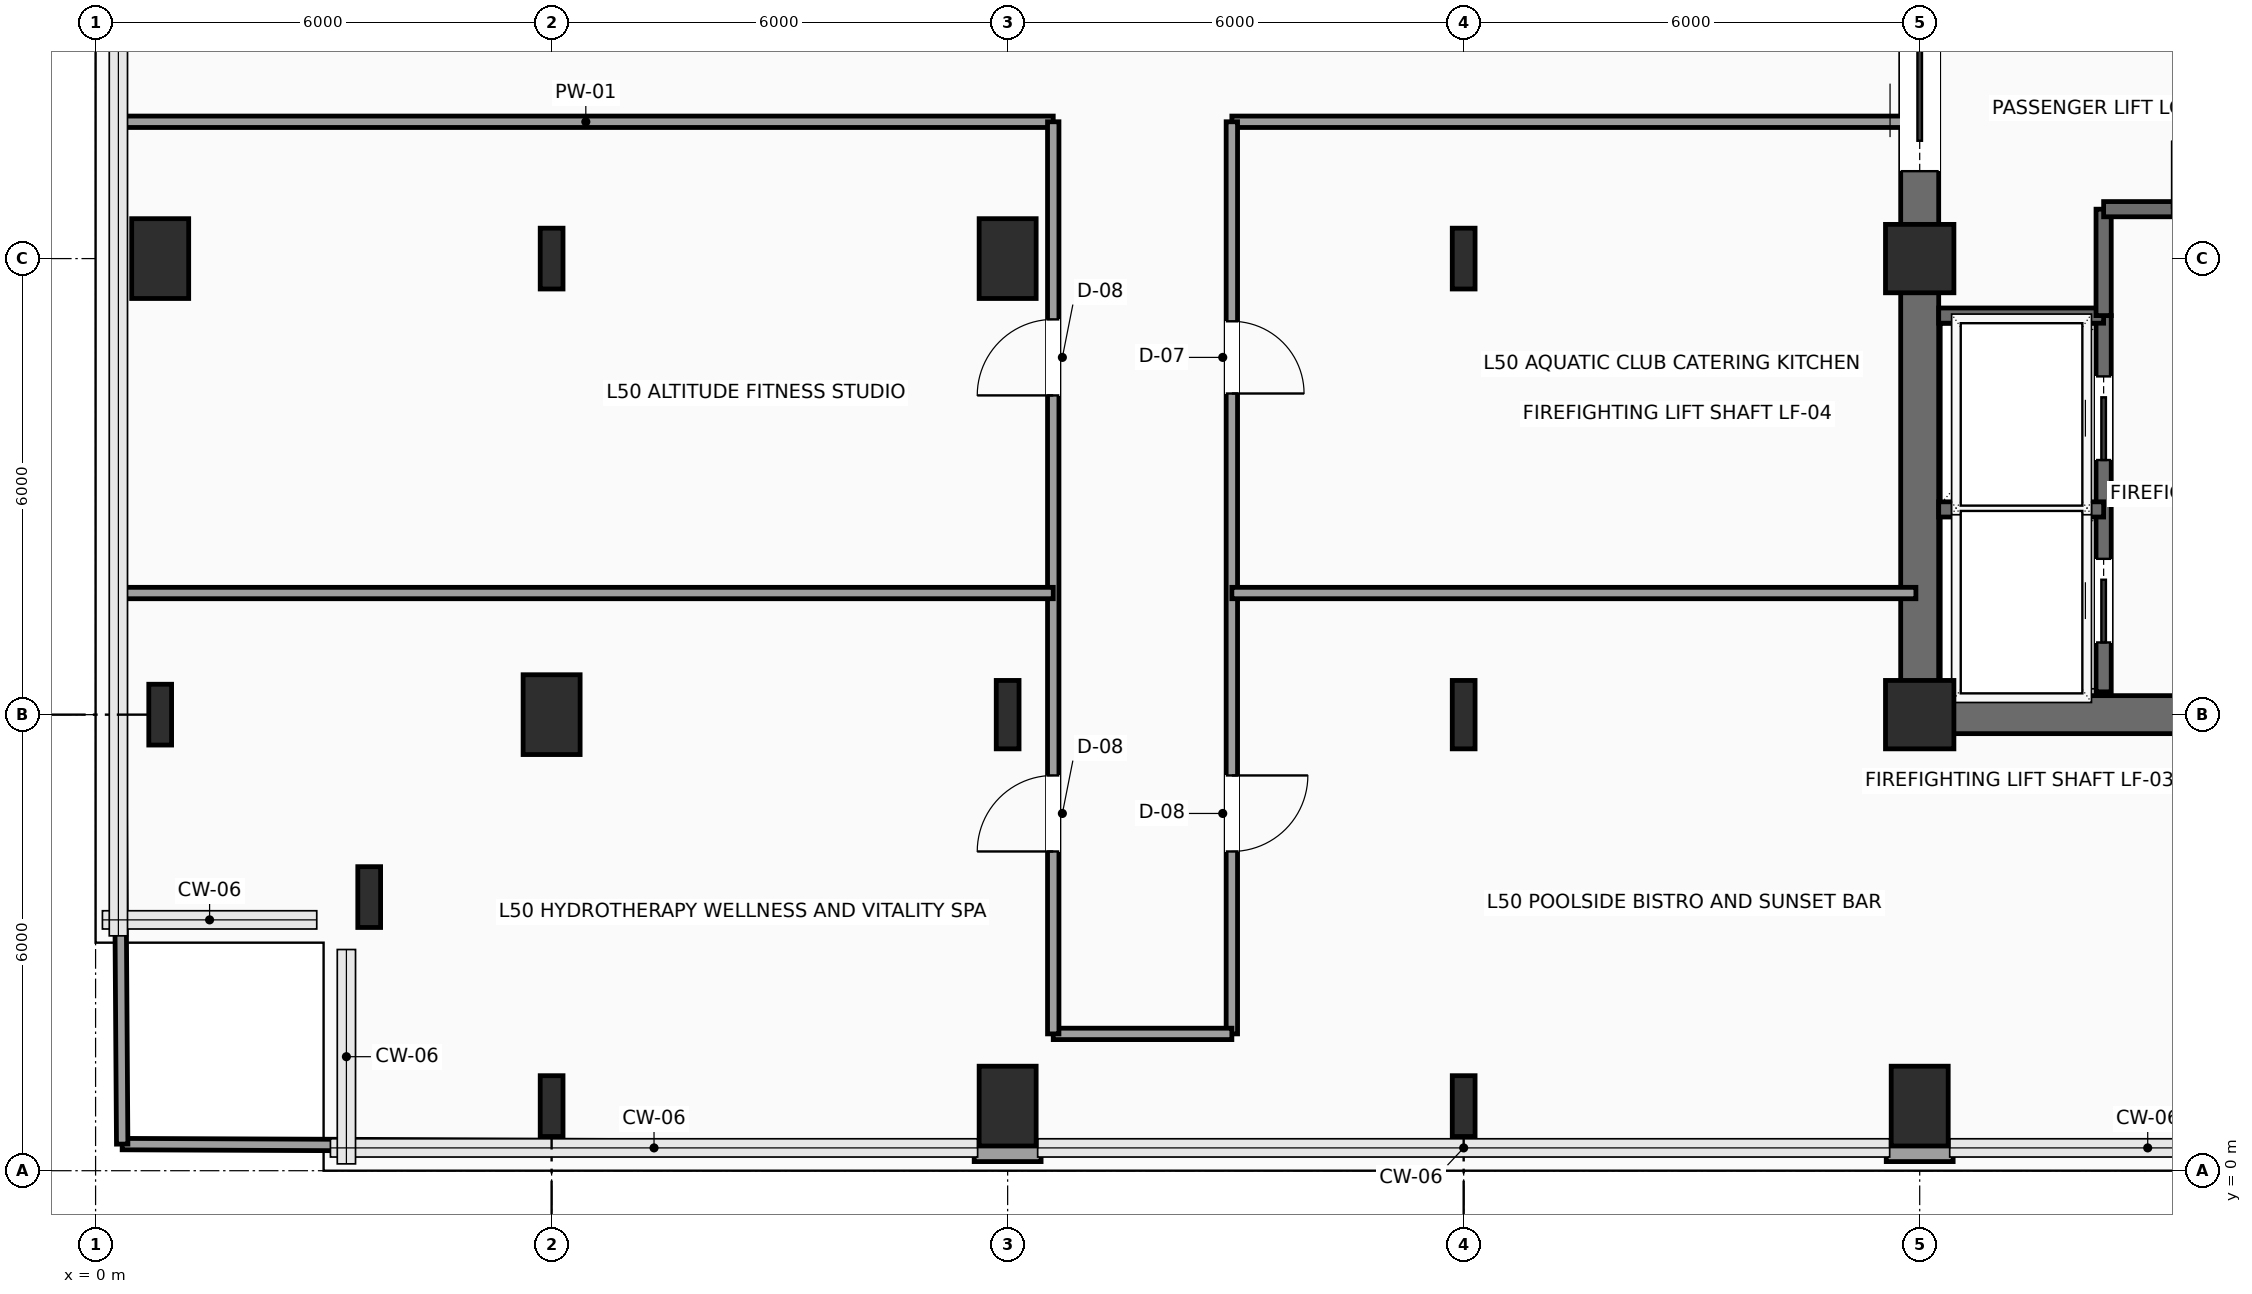
"""IFC4 building model, lengths in metres.
Left out: names, types, materials, properties, quantities, classifications, styles, units other than length and angle.
Written with IfcOpenShell. Run it as: python <this file> out.ifc"""

import sys

from ifc_helpers import new_model, si_unit, direction, frame, frame_2d, origin, origin_2d, place, context, subcontext, project, spatial, rectangle, i_section, extrude, element, fill, save


model = new_model("IFC4")
c1 = context("Model", 3, precision=1e-05, world=origin(), true_north=direction((0.0, 1.0)))
c2 = subcontext(c1, "Body", "Model", "MODEL_VIEW")
j1 = project(units=[si_unit("LENGTHUNIT", "METRE"), si_unit("PLANEANGLEUNIT", "RADIAN")], contexts=[c1])
p1 = place(None, origin())
s1 = spatial("IfcSite", under=j1, at=p1, CompositionType="ELEMENT")
p2 = place(p1, origin())
s2 = spatial("IfcBuilding", under=s1, at=p2, CompositionType="ELEMENT")
p3 = place(p2, frame((0.0, 0.0, 204.0)))
s3 = spatial("IfcBuildingStorey", under=s2, at=p3, CompositionType="ELEMENT", Elevation=204.0)
for number, where, z_axis, x_axis in (
    (1, (24.0, 6.0, 0.0), (0.0, 0.0, 1.0), (1.0, 0.0, 0.0)),
    (2, (24.0, 12.0, 0.0), (0.0, 0.0, 1.0), (1.0, 0.0, 0.0)),
):
    element("IfcColumn", number, at=place(p3, frame(where, z_axis=z_axis, x_axis=x_axis)), inside=s3, PredefinedType="COLUMN", context=c2, shape_type="SweptSolid", body=[
        extrude(rectangle(XDim=0.9, YDim=0.9, at=origin_2d()), origin(), (0.0, 0.0, 1.0), 4.65),
    ])
for number, where, z_axis, x_axis in (
    (3, (3.6, 3.6, 0.0), (0.0, 0.0, 1.0), (1.0, 0.0, 0.0)),
    (4, (0.85, 6.0, 0.0), (0.0, 0.0, 1.0), (1.0, 0.0, 0.0)),
):
    element("IfcColumn", number, at=place(p3, frame(where, z_axis=z_axis, x_axis=x_axis)), inside=s3, PredefinedType="COLUMN", context=c2, shape_type="SweptSolid", body=[
        extrude(i_section(OverallWidth=0.3, OverallDepth=0.8, WebThickness=0.018, FlangeThickness=0.033, FilletRadius=0.03, at=origin_2d()), origin(), (0.0, 0.0, 1.0), 4.65),
    ])
p4 = place(p3, frame((0.85, 12.0, 0.0), z_axis=(0.0, 0.0, 1.0), x_axis=(1.0, 0.0, 0.0)))
e5 = element("IfcColumn", 5, at=p4, inside=s3, PredefinedType="COLUMN", context=c2, shape_type="SweptSolid", body=[
    extrude(rectangle(XDim=0.75, YDim=1.05, at=origin_2d()), origin(), (0.0, 0.0, 1.0), 4.65),
])
p5 = place(p3, frame((6.0, 0.85, 0.0), z_axis=(0.0, 0.0, 1.0), x_axis=(1.0, 0.0, 0.0)))
e6 = element("IfcColumn", 6, at=p5, inside=s3, PredefinedType="COLUMN", context=c2, shape_type="SweptSolid", body=[
    extrude(i_section(OverallWidth=0.3, OverallDepth=0.8, WebThickness=0.018, FlangeThickness=0.033, FilletRadius=0.03, at=origin_2d()), origin(), (0.0, 0.0, 1.0), 4.65),
])
p6 = place(p3, frame((6.0, 6.0, 0.0), z_axis=(0.0, 0.0, 1.0), x_axis=(1.0, 0.0, 0.0)))
e7 = element("IfcColumn", 7, at=p6, inside=s3, PredefinedType="COLUMN", context=c2, shape_type="SweptSolid", body=[
    extrude(rectangle(XDim=0.75, YDim=1.05, at=origin_2d()), origin(), (0.0, 0.0, 1.0), 4.65),
])
p7 = place(p3, frame((6.0, 12.0, 0.0), z_axis=(0.0, 0.0, 1.0), x_axis=(1.0, 0.0, 0.0)))
e8 = element("IfcColumn", 8, at=p7, inside=s3, PredefinedType="COLUMN", context=c2, shape_type="SweptSolid", body=[
    extrude(i_section(OverallWidth=0.3, OverallDepth=0.8, WebThickness=0.018, FlangeThickness=0.033, FilletRadius=0.03, at=origin_2d()), origin(), (0.0, 0.0, 1.0), 4.65),
])
p8 = place(p3, frame((12.0, 0.85, 0.0), z_axis=(0.0, 0.0, 1.0), x_axis=(1.0, 0.0, 0.0)))
e9 = element("IfcColumn", 9, at=p8, inside=s3, PredefinedType="COLUMN", context=c2, shape_type="SweptSolid", body=[
    extrude(rectangle(XDim=0.75, YDim=1.05, at=origin_2d()), origin(), (0.0, 0.0, 1.0), 4.65),
])
p9 = place(p3, frame((12.0, 6.0, 0.0), z_axis=(0.0, 0.0, 1.0), x_axis=(1.0, 0.0, 0.0)))
e10 = element("IfcColumn", 10, at=p9, inside=s3, PredefinedType="COLUMN", context=c2, shape_type="SweptSolid", body=[
    extrude(i_section(OverallWidth=0.3, OverallDepth=0.9, WebThickness=0.019, FlangeThickness=0.035, FilletRadius=0.03, at=origin_2d()), origin(), (0.0, 0.0, 1.0), 4.65),
])
p10 = place(p3, frame((12.0, 12.0, 0.0), z_axis=(0.0, 0.0, 1.0), x_axis=(1.0, 0.0, 0.0)))
e11 = element("IfcColumn", 11, at=p10, inside=s3, PredefinedType="COLUMN", context=c2, shape_type="SweptSolid", body=[
    extrude(rectangle(XDim=0.75, YDim=1.05, at=origin_2d()), origin(), (0.0, 0.0, 1.0), 4.65),
])
p11 = place(p3, frame((18.0, 0.85, 0.0), z_axis=(0.0, 0.0, 1.0), x_axis=(1.0, 0.0, 0.0)))
e12 = element("IfcColumn", 12, at=p11, inside=s3, PredefinedType="COLUMN", context=c2, shape_type="SweptSolid", body=[
    extrude(i_section(OverallWidth=0.3, OverallDepth=0.8, WebThickness=0.018, FlangeThickness=0.033, FilletRadius=0.03, at=origin_2d()), origin(), (0.0, 0.0, 1.0), 4.65),
])
p12 = place(p3, frame((18.0, 6.0, 0.0), z_axis=(0.0, 0.0, 1.0), x_axis=(1.0, 0.0, 0.0)))
e13 = element("IfcColumn", 13, at=p12, inside=s3, PredefinedType="COLUMN", context=c2, shape_type="SweptSolid", body=[
    extrude(i_section(OverallWidth=0.3, OverallDepth=0.9, WebThickness=0.019, FlangeThickness=0.035, FilletRadius=0.03, at=origin_2d()), origin(), (0.0, 0.0, 1.0), 4.65),
])
p13 = place(p3, frame((18.0, 12.0, 0.0), z_axis=(0.0, 0.0, 1.0), x_axis=(1.0, 0.0, 0.0)))
e14 = element("IfcColumn", 14, at=p13, inside=s3, PredefinedType="COLUMN", context=c2, shape_type="SweptSolid", body=[
    extrude(i_section(OverallWidth=0.3, OverallDepth=0.8, WebThickness=0.018, FlangeThickness=0.033, FilletRadius=0.03, at=origin_2d()), origin(), (0.0, 0.0, 1.0), 4.65),
])
p14 = place(p3, frame((24.0, 0.85, 0.0), z_axis=(0.0, 0.0, 1.0), x_axis=(1.0, 0.0, 0.0)))
e15 = element("IfcColumn", 15, at=p14, inside=s3, PredefinedType="COLUMN", context=c2, shape_type="SweptSolid", body=[
    extrude(rectangle(XDim=0.75, YDim=1.05, at=origin_2d()), origin(), (0.0, 0.0, 1.0), 4.65),
])
for number, where, z_axis, x_axis in (
    (16, (24.44, 0.24, 0.0), (0.0, 0.0, 1.0), (-1.0, 0.0, 0.0)),
    (17, (12.44, 0.24, 0.0), (0.0, 0.0, 1.0), (-1.0, 0.0, 0.0)),
):
    element("IfcWall", number, at=place(p3, frame(where, z_axis=z_axis, x_axis=x_axis)), inside=s3, PredefinedType="SOLIDWALL", context=c2, shape_type="SweptSolid", body=[
        extrude(rectangle(XDim=0.88, YDim=0.24, at=frame_2d((0.44, 0.0))), origin(), (0.0, 0.0, 1.0), 4.44),
    ])
p15 = place(p3, frame((24.0, 6.0, 0.0), z_axis=(0.0, 0.0, 1.0), x_axis=(1.0, 0.0, 0.0)))
e18 = element("IfcWall", 18, at=p15, inside=s3, PredefinedType="SHEAR", context=c2, shape_type="SweptSolid", body=[
    extrude(rectangle(XDim=9.6, YDim=0.5, at=frame_2d((4.8, 0.0))), origin(), (0.0, 0.0, 1.0), 4.44),
])
p16 = place(p3, frame((24.0, 6.0, 0.0), z_axis=(0.0, 0.0, 1.0), x_axis=(0.0, 1.0, 0.0)))
e19 = element("IfcWall", 19, at=p16, inside=s3, PredefinedType="SHEAR", context=c2, shape_type="SweptSolid", body=[
    extrude(rectangle(XDim=12.0, YDim=0.5, at=frame_2d((6.0, 0.0))), origin(), (0.0, 0.0, 1.0), 4.44),
])
p17 = place(p16, frame((7.15, 0.0, 0.0)))
e20 = element("IfcOpeningElement", 20, at=p17, cuts=e19, PredefinedType="OPENING", context=c2, shape_type="SweptSolid", body=[
    extrude(rectangle(XDim=1.6, YDim=2.3, at=frame_2d((0.8, 1.15))), frame((0.0, 0.26, 0.0), z_axis=(0.0, -1.0, 0.0), x_axis=(1.0, 0.0, 0.0)), (0.0, 0.0, 1.0), 0.52),
])
p18 = place(p3, frame((26.42, 6.3, 0.0), z_axis=(0.0, 0.0, 1.0), x_axis=(0.0, 1.0, 0.0)))
e21 = element("IfcWall", 21, at=p18, inside=s3, PredefinedType="SHEAR", context=c2, shape_type="SweptSolid", body=[
    extrude(rectangle(XDim=4.95, YDim=0.2, at=frame_2d((2.475, 0.0))), origin(), (0.0, 0.0, 1.0), 4.44),
])
p19 = place(p18, frame((0.65, 0.0, 0.0)))
e22 = element("IfcOpeningElement", 22, at=p19, cuts=e21, PredefinedType="OPENING", context=c2, shape_type="SweptSolid", body=[
    extrude(rectangle(XDim=1.1, YDim=2.2, at=frame_2d((0.55, 1.1))), frame((0.0, 0.11, 0.0), z_axis=(0.0, -1.0, 0.0), x_axis=(1.0, 0.0, 0.0)), (0.0, 0.0, 1.0), 0.22),
])
p20 = place(p18, frame((3.05, 0.0, 0.0)))
e23 = element("IfcOpeningElement", 23, at=p20, cuts=e21, PredefinedType="OPENING", context=c2, shape_type="SweptSolid", body=[
    extrude(rectangle(XDim=1.1, YDim=2.2, at=frame_2d((0.55, 1.1))), frame((0.0, 0.11, 0.0), z_axis=(0.0, -1.0, 0.0), x_axis=(1.0, 0.0, 0.0)), (0.0, 0.0, 1.0), 0.22),
])
for number, where, z_axis, x_axis in (
    (24, (24.25, 8.7, 0.0), (0.0, 0.0, 1.0), (1.0, 0.0, 0.0)),
    (25, (24.25, 11.25, 0.0), (0.0, 0.0, 1.0), (1.0, 0.0, 0.0)),
):
    element("IfcWall", number, at=place(p3, frame(where, z_axis=z_axis, x_axis=x_axis)), inside=s3, PredefinedType="SHEAR", context=c2, shape_type="SweptSolid", body=[
        extrude(rectangle(XDim=2.17, YDim=0.2, at=frame_2d((1.085, 0.0))), origin(), (0.0, 0.0, 1.0), 4.44),
    ])
p21 = place(p3, frame((26.42, 11.25, 0.0), z_axis=(0.0, 0.0, 1.0), x_axis=(0.0, 1.0, 0.0)))
e26 = element("IfcWall", 26, at=p21, inside=s3, PredefinedType="SHEAR", context=c2, shape_type="SweptSolid", body=[
    extrude(rectangle(XDim=1.4, YDim=0.2, at=frame_2d((0.7, 0.0))), origin(), (0.0, 0.0, 1.0), 4.44),
])
p22 = place(p3, frame((26.42, 12.65, 0.0), z_axis=(0.0, 0.0, 1.0), x_axis=(1.0, 0.0, 0.0)))
e27 = element("IfcWall", 27, at=p22, inside=s3, PredefinedType="SHEAR", context=c2, shape_type="SweptSolid", body=[
    extrude(rectangle(XDim=2.84, YDim=0.2, at=frame_2d((1.42, 0.0))), origin(), (0.0, 0.0, 1.0), 4.44),
])
p23 = place(p22, frame((0.9, 0.0, 0.0)))
e28 = element("IfcOpeningElement", 28, at=p23, cuts=e27, PredefinedType="OPENING", context=c2, shape_type="SweptSolid", body=[
    extrude(rectangle(XDim=0.9, YDim=2.15, at=frame_2d((0.45, 1.075))), frame((0.0, 0.11, 0.0), z_axis=(0.0, -1.0, 0.0), x_axis=(1.0, 0.0, 0.0)), (0.0, 0.0, 1.0), 0.22),
])
p24 = place(p3, frame((12.6, 13.8, 0.0), z_axis=(0.0, 0.0, 1.0), x_axis=(-1.0, 0.0, 0.0)))
e29 = element("IfcWall", 29, at=p24, inside=s3, PredefinedType="PARTITIONING", context=c2, shape_type="SweptSolid", body=[
    extrude(rectangle(XDim=12.3, YDim=0.15, at=frame_2d((6.15, 0.0))), origin(), (0.0, 0.0, 1.0), 4.44),
])
p25 = place(p3, frame((23.95, 13.8, 0.0), z_axis=(0.0, 0.0, 1.0), x_axis=(-1.0, 0.0, 0.0)))
e30 = element("IfcWall", 30, at=p25, inside=s3, PredefinedType="PARTITIONING", context=c2, shape_type="SweptSolid", body=[
    extrude(rectangle(XDim=9.0, YDim=0.15, at=frame_2d((4.5, 0.0))), origin(), (0.0, 0.0, 1.0), 4.44),
])
p26 = place(p3, frame((14.95, 13.8, 0.0), z_axis=(0.0, 0.0, 1.0), x_axis=(0.0, -1.0, 0.0)))
e31 = element("IfcWall", 31, at=p26, inside=s3, PredefinedType="PARTITIONING", context=c2, shape_type="SweptSolid", body=[
    extrude(rectangle(XDim=12.0, YDim=0.15, at=frame_2d((6.0, 0.0))), origin(), (0.0, 0.0, 1.0), 4.44),
])
p27 = place(p26, frame((8.6, 0.0, 0.0)))
e32 = element("IfcOpeningElement", 32, at=p27, cuts=e31, PredefinedType="OPENING", context=c2, shape_type="SweptSolid", body=[
    extrude(rectangle(XDim=1.0, YDim=2.2, at=frame_2d((0.5, 1.1))), frame((0.0, 0.085, 0.0), z_axis=(0.0, -1.0, 0.0), x_axis=(1.0, 0.0, 0.0)), (0.0, 0.0, 1.0), 0.17),
])
p28 = place(p26, frame((2.625, 0.0, 0.0)))
e33 = element("IfcOpeningElement", 33, at=p28, cuts=e31, PredefinedType="OPENING", context=c2, shape_type="SweptSolid", body=[
    extrude(rectangle(XDim=0.95, YDim=2.15, at=frame_2d((0.475, 1.075))), frame((0.0, 0.085, 0.0), z_axis=(0.0, -1.0, 0.0), x_axis=(1.0, 0.0, 0.0)), (0.0, 0.0, 1.0), 0.17),
])
p29 = place(p3, frame((14.95, 1.8, 0.0), z_axis=(0.0, 0.0, 1.0), x_axis=(-1.0, 0.0, 0.0)))
e34 = element("IfcWall", 34, at=p29, inside=s3, PredefinedType="PARTITIONING", context=c2, shape_type="SweptSolid", body=[
    extrude(rectangle(XDim=2.35, YDim=0.15, at=frame_2d((1.175, 0.0))), origin(), (0.0, 0.0, 1.0), 4.44),
])
p30 = place(p3, frame((12.6, 1.8, 0.0), z_axis=(0.0, 0.0, 1.0), x_axis=(0.0, 1.0, 0.0)))
e35 = element("IfcWall", 35, at=p30, inside=s3, PredefinedType="PARTITIONING", context=c2, shape_type="SweptSolid", body=[
    extrude(rectangle(XDim=12.0, YDim=0.15, at=frame_2d((6.0, 0.0))), origin(), (0.0, 0.0, 1.0), 4.44),
])
p31 = place(p30, frame((2.4, 0.0, 0.0)))
e36 = element("IfcOpeningElement", 36, at=p31, cuts=e35, PredefinedType="OPENING", context=c2, shape_type="SweptSolid", body=[
    extrude(rectangle(XDim=1.0, YDim=2.2, at=frame_2d((0.5, 1.1))), frame((0.0, 0.085, 0.0), z_axis=(0.0, -1.0, 0.0), x_axis=(1.0, 0.0, 0.0)), (0.0, 0.0, 1.0), 0.17),
])
p32 = place(p30, frame((8.4, 0.0, 0.0)))
e37 = element("IfcOpeningElement", 37, at=p32, cuts=e35, PredefinedType="OPENING", context=c2, shape_type="SweptSolid", body=[
    extrude(rectangle(XDim=1.0, YDim=2.2, at=frame_2d((0.5, 1.1))), frame((0.0, 0.085, 0.0), z_axis=(0.0, -1.0, 0.0), x_axis=(1.0, 0.0, 0.0)), (0.0, 0.0, 1.0), 0.17),
])
p33 = place(p3, frame((0.35, 0.35, 0.0), z_axis=(0.0, 0.0, 1.0), x_axis=(0.999991617913, -0.004094398993, 0.0)))
e38 = element("IfcWall", 38, at=p33, inside=s3, PredefinedType="PARTITIONING", context=c2, shape_type="SweptSolid", body=[
    extrude(rectangle(XDim=11.21, YDim=0.15, at=frame_2d((5.605, 0.0))), origin(), (0.0, 0.0, 1.0), 4.44),
])
p34 = place(p3, frame((0.3, 7.6, 0.0), z_axis=(0.0, 0.0, 1.0), x_axis=(1.0, 0.0, 0.0)))
e39 = element("IfcWall", 39, at=p34, inside=s3, PredefinedType="PARTITIONING", context=c2, shape_type="SweptSolid", body=[
    extrude(rectangle(XDim=12.3, YDim=0.15, at=frame_2d((6.15, 0.0))), origin(), (0.0, 0.0, 1.0), 4.44),
])
p35 = place(p3, frame((0.35, 0.35, 0.0), z_axis=(0.0, 0.0, 1.0), x_axis=(-0.006903122154, 0.999976173168, 0.0)))
e40 = element("IfcWall", 40, at=p35, inside=s3, PredefinedType="PARTITIONING", context=c2, shape_type="SweptSolid", body=[
    extrude(rectangle(XDim=7.25, YDim=0.15, at=frame_2d((3.625, 0.0))), origin(), (0.0, 0.0, 1.0), 4.44),
])
p36 = place(p3, frame((14.95, 7.6, 0.0), z_axis=(0.0, 0.0, 1.0), x_axis=(1.0, 0.0, 0.0)))
e41 = element("IfcWall", 41, at=p36, inside=s3, PredefinedType="PARTITIONING", context=c2, shape_type="SweptSolid", body=[
    extrude(rectangle(XDim=9.0, YDim=0.15, at=frame_2d((4.5, 0.0))), origin(), (0.0, 0.0, 1.0), 4.44),
])
p37 = place(p17, origin())
e42 = element("IfcDoor", 42, at=p37, inside=s3, OperationType="DOUBLE_DOOR_SLIDING", PredefinedType="DOOR", context=c2, shape_type="SweptSolid", body=[
    extrude(rectangle(XDim=1.6, YDim=2.3, at=frame_2d((0.8, 1.15))), frame((0.0, 0.025, 0.0), z_axis=(0.0, -1.0, 0.0), x_axis=(1.0, 0.0, 0.0)), (0.0, 0.0, 1.0), 0.05),
])
fill(e20, e42)
p38 = place(p19, origin())
e43 = element("IfcDoor", 43, at=p38, inside=s3, OperationType="SLIDING_TO_LEFT", PredefinedType="DOOR", context=c2, shape_type="SweptSolid", body=[
    extrude(rectangle(XDim=1.1, YDim=2.2, at=frame_2d((0.55, 1.1))), frame((0.0, 0.025, 0.0), z_axis=(0.0, -1.0, 0.0), x_axis=(1.0, 0.0, 0.0)), (0.0, 0.0, 1.0), 0.05),
])
fill(e22, e43)
p39 = place(p20, origin())
e44 = element("IfcDoor", 44, at=p39, inside=s3, OperationType="SLIDING_TO_LEFT", PredefinedType="DOOR", context=c2, shape_type="SweptSolid", body=[
    extrude(rectangle(XDim=1.1, YDim=2.2, at=frame_2d((0.55, 1.1))), frame((0.0, 0.025, 0.0), z_axis=(0.0, -1.0, 0.0), x_axis=(1.0, 0.0, 0.0)), (0.0, 0.0, 1.0), 0.05),
])
fill(e23, e44)
p40 = place(p23, origin())
e45 = element("IfcDoor", 45, at=p40, inside=s3, OperationType="SINGLE_SWING_LEFT", PredefinedType="DOOR", context=c2, shape_type="SweptSolid", body=[
    extrude(rectangle(XDim=0.9, YDim=2.15, at=frame_2d((0.45, 1.075))), frame((0.0, 0.025, 0.0), z_axis=(0.0, -1.0, 0.0), x_axis=(1.0, 0.0, 0.0)), (0.0, 0.0, 1.0), 0.05),
])
fill(e28, e45)
p41 = place(p27, origin())
e46 = element("IfcDoor", 46, at=p41, inside=s3, OperationType="SINGLE_SWING_LEFT", PredefinedType="DOOR", context=c2, shape_type="SweptSolid", body=[
    extrude(rectangle(XDim=1.0, YDim=2.2, at=frame_2d((0.5, 1.1))), frame((0.0, 0.025, 0.0), z_axis=(0.0, -1.0, 0.0), x_axis=(1.0, 0.0, 0.0)), (0.0, 0.0, 1.0), 0.05),
])
fill(e32, e46)
p42 = place(p28, origin())
e47 = element("IfcDoor", 47, at=p42, inside=s3, OperationType="SINGLE_SWING_RIGHT", PredefinedType="DOOR", context=c2, shape_type="SweptSolid", body=[
    extrude(rectangle(XDim=0.95, YDim=2.15, at=frame_2d((0.475, 1.075))), frame((0.0, 0.025, 0.0), z_axis=(0.0, -1.0, 0.0), x_axis=(1.0, 0.0, 0.0)), (0.0, 0.0, 1.0), 0.05),
])
fill(e33, e47)
p43 = place(p31, origin())
e48 = element("IfcDoor", 48, at=p43, inside=s3, OperationType="SINGLE_SWING_LEFT", PredefinedType="DOOR", context=c2, shape_type="SweptSolid", body=[
    extrude(rectangle(XDim=1.0, YDim=2.2, at=frame_2d((0.5, 1.1))), frame((0.0, 0.025, 0.0), z_axis=(0.0, -1.0, 0.0), x_axis=(1.0, 0.0, 0.0)), (0.0, 0.0, 1.0), 0.05),
])
fill(e36, e48)
p44 = place(p32, origin())
e49 = element("IfcDoor", 49, at=p44, inside=s3, OperationType="SINGLE_SWING_LEFT", PredefinedType="DOOR", context=c2, shape_type="SweptSolid", body=[
    extrude(rectangle(XDim=1.0, YDim=2.2, at=frame_2d((0.5, 1.1))), frame((0.0, 0.025, 0.0), z_axis=(0.0, -1.0, 0.0), x_axis=(1.0, 0.0, 0.0)), (0.0, 0.0, 1.0), 0.05),
])
fill(e37, e49)
save(model, sys.argv[1])
